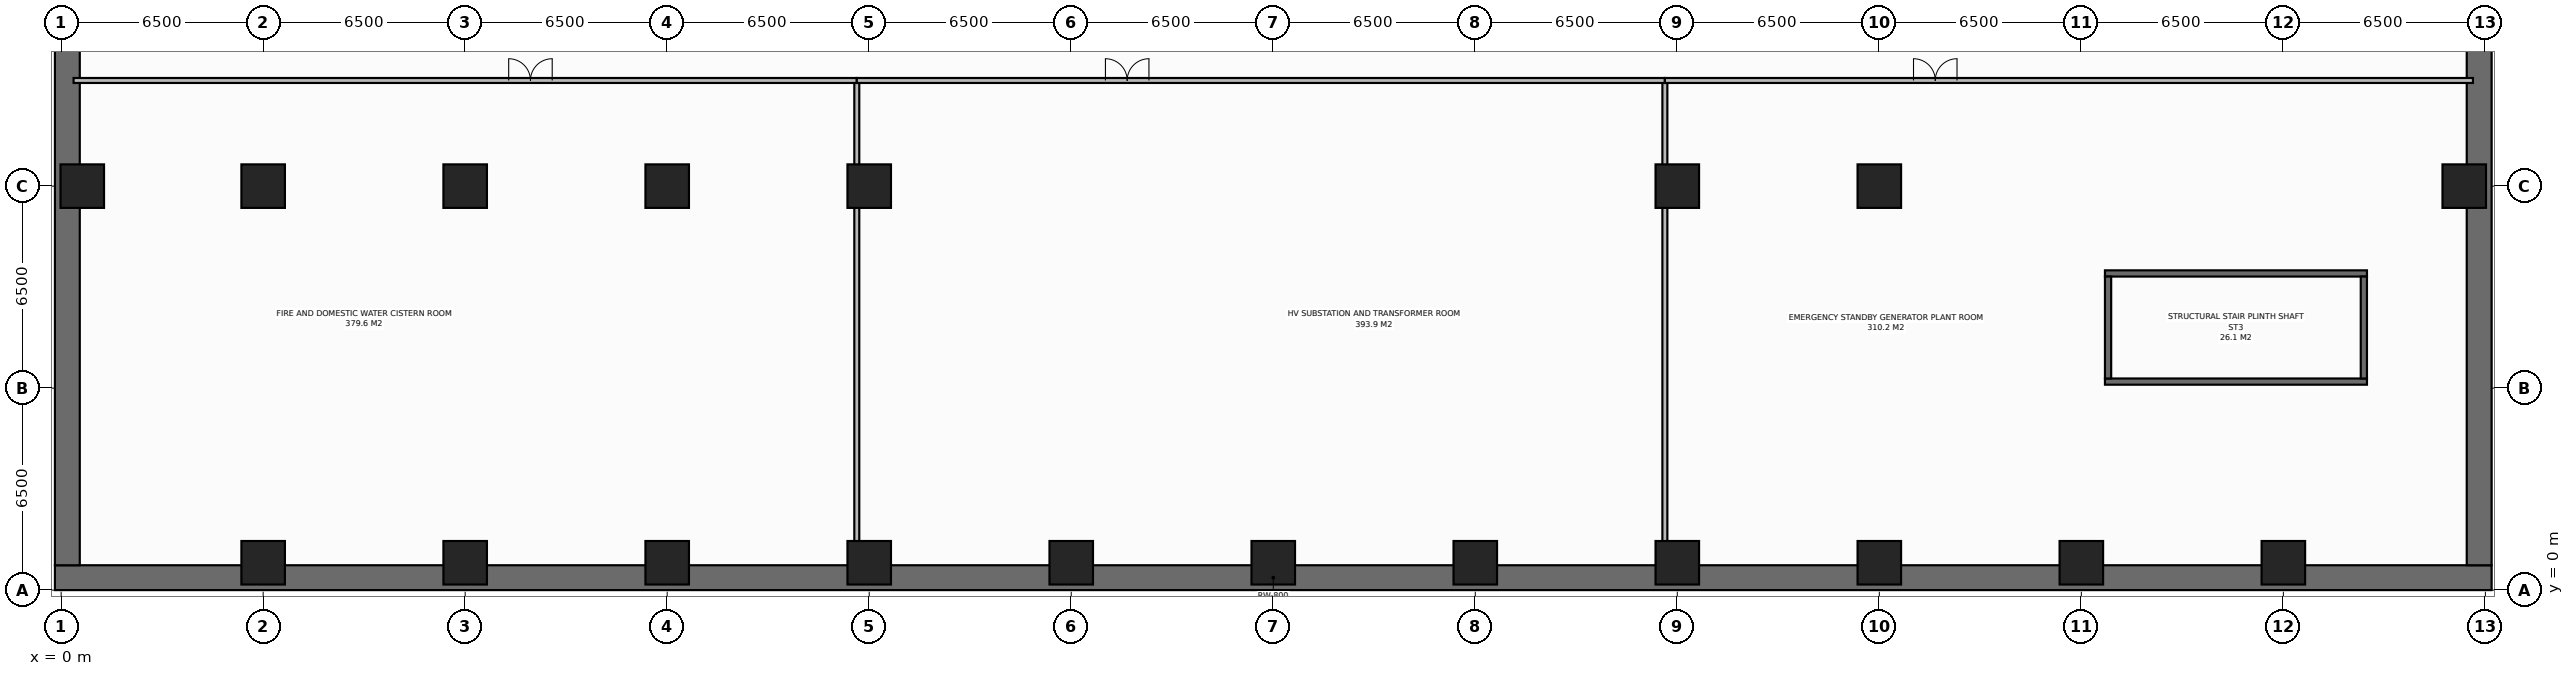
"""IFC4 building model, lengths in metres.
Left out: names, types, materials, properties, quantities, classifications, styles, units other than length and angle.
Written with IfcOpenShell. Run it as: python <this file> out.ifc"""

import sys

from ifc_helpers import new_model, si_unit, direction, frame, frame_2d, origin, origin_2d, place, context, subcontext, project, spatial, rectangle, extrude, element, fill, save


model = new_model("IFC4")
c1 = context("Model", 3, precision=1e-05, world=origin(), true_north=direction((0.0, 1.0)))
c2 = subcontext(c1, "Body", "Model", "MODEL_VIEW")
j1 = project(units=[si_unit("LENGTHUNIT", "METRE"), si_unit("PLANEANGLEUNIT", "RADIAN")], contexts=[c1])
p1 = place(None, origin())
s1 = spatial("IfcSite", under=j1, at=p1, CompositionType="ELEMENT")
p2 = place(p1, origin())
s2 = spatial("IfcBuilding", under=s1, at=p2, CompositionType="ELEMENT")
p3 = place(p2, frame((0.0, 0.0, -13.5)))
s3 = spatial("IfcBuildingStorey", under=s2, at=p3, CompositionType="ELEMENT", Elevation=-13.5)
p4 = place(p3, frame((-0.2, 0.4, 0.0), z_axis=(0.0, 0.0, 1.0), x_axis=(1.0, 0.0, 0.0)))
e1 = element("IfcWall", 1, at=p4, inside=s3, PredefinedType="USERDEFINED", context=c2, shape_type="SweptSolid", body=[
    extrude(rectangle(XDim=78.4, YDim=0.8, at=frame_2d((39.2, 0.0))), origin(), (0.0, 0.0, 1.0), 4.2),
])
for number, where, z_axis, x_axis in (
    (2, (0.2, 51.2, 0.0), (0.0, 0.0, 1.0), (0.0, -1.0, 0.0)),
    (3, (77.8, 0.8, 0.0), (0.0, 0.0, 1.0), (0.0, 1.0, 0.0)),
):
    element("IfcWall", number, at=place(p3, frame(where, z_axis=z_axis, x_axis=x_axis)), inside=s3, PredefinedType="USERDEFINED", context=c2, shape_type="SweptSolid", body=[
        extrude(rectangle(XDim=50.4, YDim=0.8, at=frame_2d((25.2, 0.0))), origin(), (0.0, 0.0, 1.0), 4.2),
    ])
for number, where, z_axis, x_axis in (
    (4, (65.76, 6.71, 0.0), (0.0, 0.0, 1.0), (1.0, 0.0, 0.0)),
    (5, (65.76, 10.19, 0.0), (0.0, 0.0, 1.0), (1.0, 0.0, 0.0)),
):
    element("IfcWall", number, at=place(p3, frame(where, z_axis=z_axis, x_axis=x_axis)), inside=s3, PredefinedType="SHEAR", context=c2, shape_type="SweptSolid", body=[
        extrude(rectangle(XDim=8.43, YDim=0.2, at=frame_2d((4.215, 0.0))), origin(), (0.0, 0.0, 1.0), 4.5),
    ])
for number, where, z_axis, x_axis in (
    (6, (65.86, 6.81, 0.0), (0.0, 0.0, 1.0), (0.0, 1.0, 0.0)),
    (7, (74.09, 6.81, 0.0), (0.0, 0.0, 1.0), (0.0, 1.0, 0.0)),
):
    element("IfcWall", number, at=place(p3, frame(where, z_axis=z_axis, x_axis=x_axis)), inside=s3, PredefinedType="SHEAR", context=c2, shape_type="SweptSolid", body=[
        extrude(rectangle(XDim=3.28, YDim=0.2, at=frame_2d((1.64, 0.0))), origin(), (0.0, 0.0, 1.0), 4.5),
    ])
for number, where, z_axis, x_axis in (
    (8, (58.5, 13.0, 0.0), (0.0, 0.0, 1.0), (1.0, 0.0, 0.0)),
    (9, (6.5, 13.0, 0.0), (0.0, 0.0, 1.0), (1.0, 0.0, 0.0)),
    (10, (13.0, 13.0, 0.0), (0.0, 0.0, 1.0), (1.0, 0.0, 0.0)),
    (11, (19.5, 13.0, 0.0), (0.0, 0.0, 1.0), (1.0, 0.0, 0.0)),
    (12, (26.0, 13.0, 0.0), (0.0, 0.0, 1.0), (1.0, 0.0, 0.0)),
    (13, (52.0, 13.0, 0.0), (0.0, 0.0, 1.0), (1.0, 0.0, 0.0)),
    (14, (6.5, 0.88, 0.0), (0.0, 0.0, 1.0), (1.0, 0.0, 0.0)),
    (15, (13.0, 0.88, 0.0), (0.0, 0.0, 1.0), (1.0, 0.0, 0.0)),
    (16, (19.5, 0.88, 0.0), (0.0, 0.0, 1.0), (1.0, 0.0, 0.0)),
    (17, (26.0, 0.88, 0.0), (0.0, 0.0, 1.0), (1.0, 0.0, 0.0)),
    (18, (32.5, 0.88, 0.0), (0.0, 0.0, 1.0), (1.0, 0.0, 0.0)),
    (19, (39.0, 0.88, 0.0), (0.0, 0.0, 1.0), (1.0, 0.0, 0.0)),
    (20, (45.5, 0.88, 0.0), (0.0, 0.0, 1.0), (1.0, 0.0, 0.0)),
    (21, (52.0, 0.88, 0.0), (0.0, 0.0, 1.0), (1.0, 0.0, 0.0)),
    (22, (58.5, 0.88, 0.0), (0.0, 0.0, 1.0), (1.0, 0.0, 0.0)),
    (23, (65.0, 0.88, 0.0), (0.0, 0.0, 1.0), (1.0, 0.0, 0.0)),
    (24, (71.5, 0.88, 0.0), (0.0, 0.0, 1.0), (1.0, 0.0, 0.0)),
    (25, (0.68, 13.0, 0.0), (0.0, 0.0, 1.0), (1.0, 0.0, 0.0)),
    (26, (77.32, 13.0, 0.0), (0.0, 0.0, 1.0), (1.0, 0.0, 0.0)),
):
    element("IfcColumn", number, at=place(p3, frame(where, z_axis=z_axis, x_axis=x_axis)), inside=s3, PredefinedType="COLUMN", context=c2, shape_type="SweptSolid", body=[
        extrude(rectangle(XDim=1.4, YDim=1.4, at=origin_2d()), origin(), (0.0, 0.0, 1.0), 4.5),
    ])
for number, where, z_axis, x_axis in (
    (27, (25.6, 0.4, 0.0), (0.0, 0.0, 1.0), (0.0, 1.0, 0.0)),
    (28, (51.6, 0.4, 0.0), (0.0, 0.0, 1.0), (0.0, 1.0, 0.0)),
):
    element("IfcWall", number, at=place(p3, frame(where, z_axis=z_axis, x_axis=x_axis)), inside=s3, PredefinedType="STANDARD", context=c2, shape_type="SweptSolid", body=[
        extrude(rectangle(XDim=16.0, YDim=0.16, at=frame_2d((8.0, 0.0))), origin(), (0.0, 0.0, 1.0), 4.2),
    ])
p5 = place(p3, frame((0.4, 16.4, 0.0), z_axis=(0.0, 0.0, 1.0), x_axis=(1.0, 0.0, 0.0)))
e29 = element("IfcWall", 29, at=p5, inside=s3, PredefinedType="STANDARD", context=c2, shape_type="SweptSolid", body=[
    extrude(rectangle(XDim=25.2, YDim=0.16, at=frame_2d((12.6, 0.0))), origin(), (0.0, 0.0, 1.0), 4.2),
])
p6 = place(p5, frame((14.0, 0.0, 0.0)))
e30 = element("IfcOpeningElement", 30, at=p6, cuts=e29, PredefinedType="OPENING", context=c2, shape_type="SweptSolid", body=[
    extrude(rectangle(XDim=1.4, YDim=2.2, at=frame_2d((0.7, 1.1))), frame((0.0, 0.09, 0.0), z_axis=(0.0, -1.0, 0.0), x_axis=(1.0, 0.0, 0.0)), (0.0, 0.0, 1.0), 0.18),
])
p7 = place(p3, frame((25.6, 16.4, 0.0), z_axis=(0.0, 0.0, 1.0), x_axis=(1.0, 0.0, 0.0)))
e31 = element("IfcWall", 31, at=p7, inside=s3, PredefinedType="STANDARD", context=c2, shape_type="SweptSolid", body=[
    extrude(rectangle(XDim=26.0, YDim=0.16, at=frame_2d((13.0, 0.0))), origin(), (0.0, 0.0, 1.0), 4.2),
])
p8 = place(p7, frame((8.0, 0.0, 0.0)))
e32 = element("IfcOpeningElement", 32, at=p8, cuts=e31, PredefinedType="OPENING", context=c2, shape_type="SweptSolid", body=[
    extrude(rectangle(XDim=1.4, YDim=2.2, at=frame_2d((0.7, 1.1))), frame((0.0, 0.09, 0.0), z_axis=(0.0, -1.0, 0.0), x_axis=(1.0, 0.0, 0.0)), (0.0, 0.0, 1.0), 0.18),
])
p9 = place(p3, frame((51.6, 16.4, 0.0), z_axis=(0.0, 0.0, 1.0), x_axis=(1.0, 0.0, 0.0)))
e33 = element("IfcWall", 33, at=p9, inside=s3, PredefinedType="STANDARD", context=c2, shape_type="SweptSolid", body=[
    extrude(rectangle(XDim=26.0, YDim=0.16, at=frame_2d((13.0, 0.0))), origin(), (0.0, 0.0, 1.0), 4.2),
])
p10 = place(p9, frame((8.0, 0.0, 0.0)))
e34 = element("IfcOpeningElement", 34, at=p10, cuts=e33, PredefinedType="OPENING", context=c2, shape_type="SweptSolid", body=[
    extrude(rectangle(XDim=1.4, YDim=2.2, at=frame_2d((0.7, 1.1))), frame((0.0, 0.09, 0.0), z_axis=(0.0, -1.0, 0.0), x_axis=(1.0, 0.0, 0.0)), (0.0, 0.0, 1.0), 0.18),
])
p11 = place(p6, origin())
e35 = element("IfcDoor", 35, at=p11, inside=s3, OperationType="DOUBLE_DOOR_SINGLE_SWING", PredefinedType="DOOR", context=c2, shape_type="SweptSolid", body=[
    extrude(rectangle(XDim=1.4, YDim=2.2, at=frame_2d((0.7, 1.1))), frame((0.0, 0.025, 0.0), z_axis=(0.0, -1.0, 0.0), x_axis=(1.0, 0.0, 0.0)), (0.0, 0.0, 1.0), 0.05),
])
fill(e30, e35)
p12 = place(p8, origin())
e36 = element("IfcDoor", 36, at=p12, inside=s3, OperationType="DOUBLE_DOOR_SINGLE_SWING", PredefinedType="DOOR", context=c2, shape_type="SweptSolid", body=[
    extrude(rectangle(XDim=1.4, YDim=2.2, at=frame_2d((0.7, 1.1))), frame((0.0, 0.025, 0.0), z_axis=(0.0, -1.0, 0.0), x_axis=(1.0, 0.0, 0.0)), (0.0, 0.0, 1.0), 0.05),
])
fill(e32, e36)
p13 = place(p10, origin())
e37 = element("IfcDoor", 37, at=p13, inside=s3, OperationType="DOUBLE_DOOR_SINGLE_SWING", PredefinedType="DOOR", context=c2, shape_type="SweptSolid", body=[
    extrude(rectangle(XDim=1.4, YDim=2.2, at=frame_2d((0.7, 1.1))), frame((0.0, 0.025, 0.0), z_axis=(0.0, -1.0, 0.0), x_axis=(1.0, 0.0, 0.0)), (0.0, 0.0, 1.0), 0.05),
])
fill(e34, e37)
save(model, sys.argv[1])
